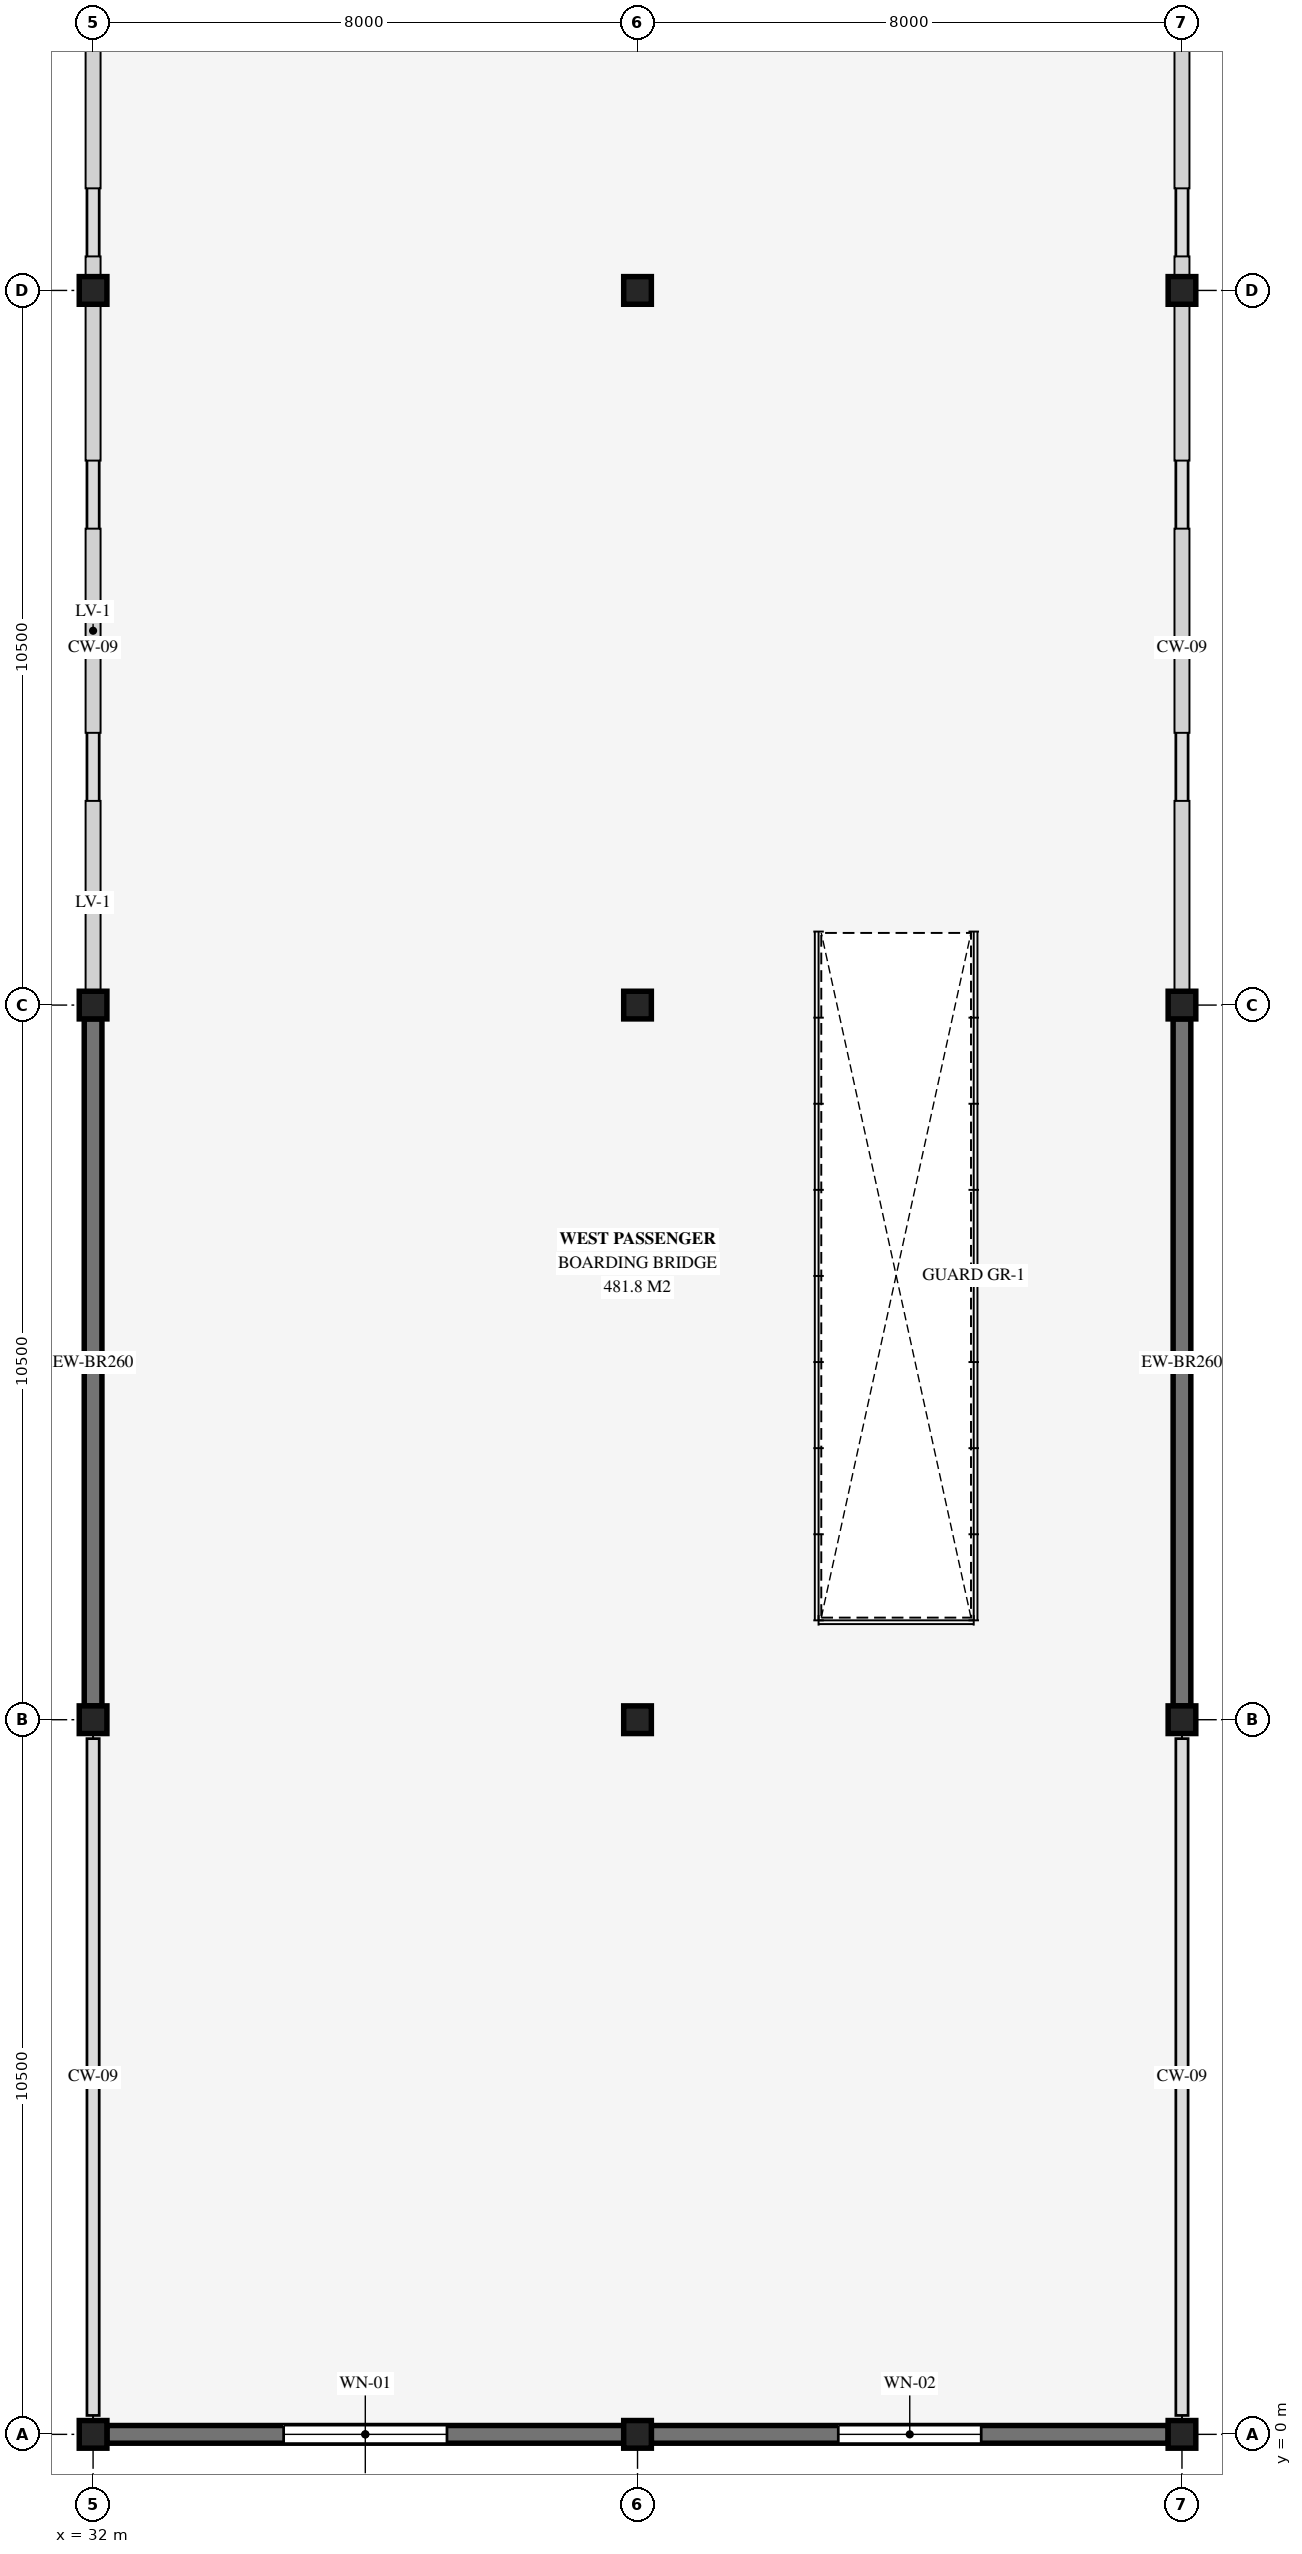
"""IFC4 building model, lengths in metres.
Left out: names, types, materials, properties, quantities, classifications, styles, units other than length and angle.
Written with IfcOpenShell. Run it as: python <this file> out.ifc"""

import sys

from ifc_helpers import new_model, si_unit, direction, frame, frame_2d, origin, origin_2d, place, context, subcontext, project, spatial, rectangle, hollow_circle, extrude, element, fill, save


model = new_model("IFC4")
c1 = context("Model", 3, precision=1e-05, world=origin(), true_north=direction((0.0, 1.0)))
c2 = subcontext(c1, "Body", "Model", "MODEL_VIEW")
j1 = project(units=[si_unit("LENGTHUNIT", "METRE"), si_unit("PLANEANGLEUNIT", "RADIAN")], contexts=[c1])
p1 = place(None, origin())
s1 = spatial("IfcSite", under=j1, at=p1, CompositionType="ELEMENT")
p2 = place(p1, origin())
s2 = spatial("IfcBuilding", under=s1, at=p2, CompositionType="ELEMENT")
p3 = place(p2, frame((0.0, 0.0, 5.4)))
s3 = spatial("IfcBuildingStorey", under=s2, at=p3, CompositionType="ELEMENT", Elevation=5.4)
for number, where, z_axis, x_axis in (
    (1, (32.0, 0.0, 0.0), (0.0, 0.0, 1.0), (1.0, 0.0, 0.0)),
    (2, (32.0, 10.5, 0.0), (0.0, 0.0, 1.0), (1.0, 0.0, 0.0)),
    (3, (32.0, 21.0, 0.0), (0.0, 0.0, 1.0), (1.0, 0.0, 0.0)),
    (4, (32.0, 31.5, 0.0), (0.0, 0.0, 1.0), (1.0, 0.0, 0.0)),
    (5, (40.0, 0.0, 0.0), (0.0, 0.0, 1.0), (1.0, 0.0, 0.0)),
    (6, (40.0, 10.5, 0.0), (0.0, 0.0, 1.0), (1.0, 0.0, 0.0)),
    (7, (40.0, 21.0, 0.0), (0.0, 0.0, 1.0), (1.0, 0.0, 0.0)),
    (8, (40.0, 31.5, 0.0), (0.0, 0.0, 1.0), (1.0, 0.0, 0.0)),
    (9, (48.0, 0.0, 0.0), (0.0, 0.0, 1.0), (1.0, 0.0, 0.0)),
    (10, (48.0, 10.5, 0.0), (0.0, 0.0, 1.0), (1.0, 0.0, 0.0)),
    (11, (48.0, 21.0, 0.0), (0.0, 0.0, 1.0), (1.0, 0.0, 0.0)),
    (12, (48.0, 31.5, 0.0), (0.0, 0.0, 1.0), (1.0, 0.0, 0.0)),
):
    element("IfcColumn", number, at=place(p3, frame(where, z_axis=z_axis, x_axis=x_axis)), inside=s3, PredefinedType="COLUMN", context=c2, shape_type="SweptSolid", body=[
        extrude(hollow_circle(Radius=0.203, WallThickness=0.016, at=origin_2d()), origin(), (0.0, 0.0, 1.0), 4.64),
    ])
for number, where, z_axis, x_axis in (
    (13, (32.0, 10.703, 0.0), (0.0, 0.0, 1.0), (0.0, 1.0, 0.0)),
    (14, (48.0, 10.703, 0.0), (0.0, 0.0, 1.0), (0.0, 1.0, 0.0)),
):
    element("IfcWall", number, at=place(p3, frame(where, z_axis=z_axis, x_axis=x_axis)), inside=s3, PredefinedType="SOLIDWALL", context=c2, shape_type="SweptSolid", body=[
        extrude(rectangle(XDim=10.094, YDim=0.26, at=frame_2d((5.047, 0.0))), origin(), (0.0, 0.0, 1.0), 4.52),
    ])
p4 = place(p3, frame((39.797, 0.0, 0.0), z_axis=(0.0, 0.0, 1.0), x_axis=(-1.0, 0.0, 0.0)))
e15 = element("IfcWall", 15, at=p4, inside=s3, PredefinedType="SOLIDWALL", context=c2, shape_type="SweptSolid", body=[
    extrude(rectangle(XDim=7.594, YDim=0.26, at=frame_2d((3.797, 0.0))), origin(), (0.0, 0.0, 1.0), 4.52),
])
p5 = place(p4, frame((2.597, 0.0, 1.0)))
e16 = element("IfcOpeningElement", 16, at=p5, cuts=e15, PredefinedType="OPENING", context=c2, shape_type="SweptSolid", body=[
    extrude(rectangle(XDim=2.4, YDim=2.2, at=frame_2d((1.2, 1.1))), frame((0.0, 0.14, 0.0), z_axis=(0.0, -1.0, 0.0), x_axis=(1.0, 0.0, 0.0)), (0.0, 0.0, 1.0), 0.28),
])
p6 = place(p3, frame((47.797, 0.0, 0.0), z_axis=(0.0, 0.0, 1.0), x_axis=(-1.0, 0.0, 0.0)))
e17 = element("IfcWall", 17, at=p6, inside=s3, PredefinedType="SOLIDWALL", context=c2, shape_type="SweptSolid", body=[
    extrude(rectangle(XDim=7.594, YDim=0.26, at=frame_2d((3.797, 0.0))), origin(), (0.0, 0.0, 1.0), 4.52),
])
p7 = place(p6, frame((2.747, 0.0, 1.0)))
e18 = element("IfcOpeningElement", 18, at=p7, cuts=e17, PredefinedType="OPENING", context=c2, shape_type="SweptSolid", body=[
    extrude(rectangle(XDim=2.1, YDim=2.2, at=frame_2d((1.05, 1.1))), frame((0.0, 0.14, 0.0), z_axis=(0.0, -1.0, 0.0), x_axis=(1.0, 0.0, 0.0)), (0.0, 0.0, 1.0), 0.28),
])
p8 = place(p5, origin())
e19 = element("IfcWindow", 19, at=p8, inside=s3, PartitioningType="SINGLE_PANEL", PredefinedType="WINDOW", context=c2, shape_type="SweptSolid", body=[
    extrude(rectangle(XDim=2.4, YDim=2.2, at=frame_2d((1.2, 1.1))), frame((0.0, 0.03, 0.0), z_axis=(0.0, -1.0, 0.0), x_axis=(1.0, 0.0, 0.0)), (0.0, 0.0, 1.0), 0.06),
])
fill(e16, e19)
p9 = place(p7, origin())
e20 = element("IfcWindow", 20, at=p9, inside=s3, PartitioningType="SINGLE_PANEL", PredefinedType="WINDOW", context=c2, shape_type="SweptSolid", body=[
    extrude(rectangle(XDim=2.1, YDim=2.2, at=frame_2d((1.05, 1.1))), frame((0.0, 0.03, 0.0), z_axis=(0.0, -1.0, 0.0), x_axis=(1.0, 0.0, 0.0)), (0.0, 0.0, 1.0), 0.06),
])
fill(e18, e20)
save(model, sys.argv[1])
